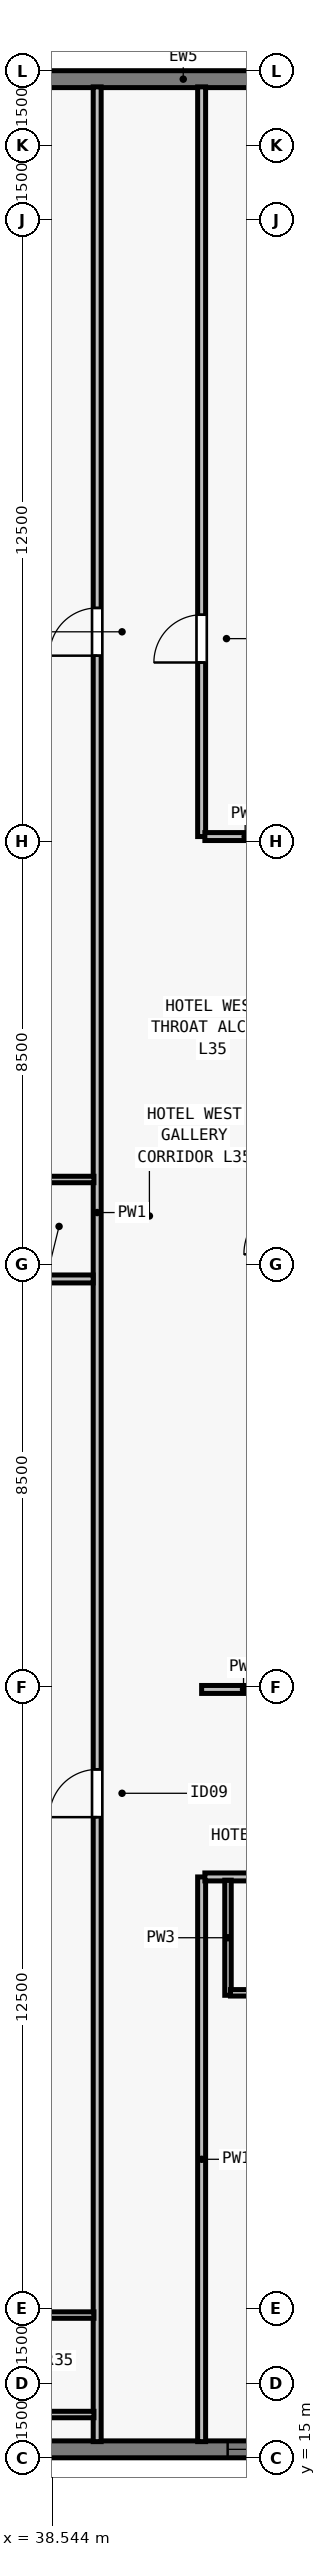
"""IFC4 building model, lengths in metres.
Left out: names, types, materials, properties, quantities, classifications, styles, units other than length and angle.
Written with IfcOpenShell. Run it as: python <this file> out.ifc"""

import sys

from ifc_helpers import new_model, si_unit, direction, frame, frame_2d, origin, place, context, subcontext, project, spatial, rectangle, extrude, element, fill, save


model = new_model("IFC4")
c1 = context("Model", 3, precision=1e-05, world=origin(), true_north=direction((0.0, 1.0)))
c2 = subcontext(c1, "Body", "Model", "MODEL_VIEW")
j1 = project(units=[si_unit("LENGTHUNIT", "METRE"), si_unit("PLANEANGLEUNIT", "RADIAN")], contexts=[c1])
p1 = place(None, origin())
s1 = spatial("IfcSite", under=j1, at=p1, CompositionType="ELEMENT")
p2 = place(p1, origin())
s2 = spatial("IfcBuilding", under=s1, at=p2, CompositionType="ELEMENT")
p3 = place(p2, frame((0.0, 0.0, 130.5)))
s3 = spatial("IfcBuildingStorey", under=s2, at=p3, CompositionType="ELEMENT", Elevation=130.5)
p4 = place(p3, frame((32.0, 62.83, 0.0), z_axis=(0.0, 0.0, 1.0), x_axis=(1.0, 0.0, 0.0)))
e1 = element("IfcWall", 1, at=p4, inside=s3, PredefinedType="SOLIDWALL", context=c2, shape_type="SweptSolid", body=[
    extrude(rectangle(XDim=39.682, YDim=0.34, at=frame_2d((19.841, 0.0))), origin(), (0.0, 0.0, 1.0), 3.28),
])
p5 = place(p4, frame((4.752, 0.0, 0.8)))
e2 = element("IfcOpeningElement", 2, at=p5, cuts=e1, PredefinedType="OPENING", context=c2, shape_type="SweptSolid", body=[
    extrude(rectangle(XDim=1.75, YDim=1.66, at=frame_2d((0.875, 0.83))), frame((0.0, 0.18, 0.0), z_axis=(0.0, -1.0, 0.0), x_axis=(1.0, 0.0, 0.0)), (0.0, 0.0, 1.0), 0.36),
])
p6 = place(p4, frame((11.859, 0.0, 0.8)))
e3 = element("IfcOpeningElement", 3, at=p6, cuts=e1, PredefinedType="OPENING", context=c2, shape_type="SweptSolid", body=[
    extrude(rectangle(XDim=1.75, YDim=1.66, at=frame_2d((0.875, 0.83))), frame((0.0, 0.18, 0.0), z_axis=(0.0, -1.0, 0.0), x_axis=(1.0, 0.0, 0.0)), (0.0, 0.0, 1.0), 0.36),
])
p7 = place(p4, frame((16.062, 0.0, 0.8)))
e4 = element("IfcOpeningElement", 4, at=p7, cuts=e1, PredefinedType="OPENING", context=c2, shape_type="SweptSolid", body=[
    extrude(rectangle(XDim=1.35, YDim=1.66, at=frame_2d((0.675, 0.83))), frame((0.0, 0.18, 0.0), z_axis=(0.0, -1.0, 0.0), x_axis=(1.0, 0.0, 0.0)), (0.0, 0.0, 1.0), 0.36),
])
p8 = place(p4, frame((18.966, 0.0, 0.8)))
e5 = element("IfcOpeningElement", 5, at=p8, cuts=e1, PredefinedType="OPENING", context=c2, shape_type="SweptSolid", body=[
    extrude(rectangle(XDim=1.75, YDim=1.66, at=frame_2d((0.875, 0.83))), frame((0.0, 0.18, 0.0), z_axis=(0.0, -1.0, 0.0), x_axis=(1.0, 0.0, 0.0)), (0.0, 0.0, 1.0), 0.36),
])
p9 = place(p4, frame((22.719, 0.0, 0.8)))
e6 = element("IfcOpeningElement", 6, at=p9, cuts=e1, PredefinedType="OPENING", context=c2, shape_type="SweptSolid", body=[
    extrude(rectangle(XDim=1.35, YDim=1.66, at=frame_2d((0.675, 0.83))), frame((0.0, 0.18, 0.0), z_axis=(0.0, -1.0, 0.0), x_axis=(1.0, 0.0, 0.0)), (0.0, 0.0, 1.0), 0.36),
])
p10 = place(p4, frame((26.073, 0.0, 0.8)))
e7 = element("IfcOpeningElement", 7, at=p10, cuts=e1, PredefinedType="OPENING", context=c2, shape_type="SweptSolid", body=[
    extrude(rectangle(XDim=1.75, YDim=1.66, at=frame_2d((0.875, 0.83))), frame((0.0, 0.18, 0.0), z_axis=(0.0, -1.0, 0.0), x_axis=(1.0, 0.0, 0.0)), (0.0, 0.0, 1.0), 0.36),
])
p11 = place(p4, frame((29.827, 0.0, 0.8)))
e8 = element("IfcOpeningElement", 8, at=p11, cuts=e1, PredefinedType="OPENING", context=c2, shape_type="SweptSolid", body=[
    extrude(rectangle(XDim=1.35, YDim=1.66, at=frame_2d((0.675, 0.83))), frame((0.0, 0.18, 0.0), z_axis=(0.0, -1.0, 0.0), x_axis=(1.0, 0.0, 0.0)), (0.0, 0.0, 1.0), 0.36),
])
p12 = place(p4, frame((34.23, 0.0, 0.8)))
e9 = element("IfcOpeningElement", 9, at=p12, cuts=e1, PredefinedType="OPENING", context=c2, shape_type="SweptSolid", body=[
    extrude(rectangle(XDim=0.9, YDim=1.66, at=frame_2d((0.45, 0.83))), frame((0.0, 0.18, 0.0), z_axis=(0.0, -1.0, 0.0), x_axis=(1.0, 0.0, 0.0)), (0.0, 0.0, 1.0), 0.36),
])
p13 = place(p3, frame((72.0, 15.17, 0.0), z_axis=(0.0, 0.0, 1.0), x_axis=(-1.0, 0.0, 0.0)))
e10 = element("IfcWall", 10, at=p13, inside=s3, PredefinedType="SOLIDWALL", context=c2, shape_type="SweptSolid", body=[
    extrude(rectangle(XDim=39.682, YDim=0.34, at=frame_2d((19.841, 0.0))), origin(), (0.0, 0.0, 1.0), 3.28),
])
p14 = place(p13, frame((8.955, 0.0, 0.8)))
e11 = element("IfcOpeningElement", 11, at=p14, cuts=e10, PredefinedType="OPENING", context=c2, shape_type="SweptSolid", body=[
    extrude(rectangle(XDim=1.35, YDim=1.66, at=frame_2d((0.675, 0.83))), frame((0.0, 0.18, 0.0), z_axis=(0.0, -1.0, 0.0), x_axis=(1.0, 0.0, 0.0)), (0.0, 0.0, 1.0), 0.36),
])
p15 = place(p13, frame((11.859, 0.0, 0.8)))
e12 = element("IfcOpeningElement", 12, at=p15, cuts=e10, PredefinedType="OPENING", context=c2, shape_type="SweptSolid", body=[
    extrude(rectangle(XDim=1.75, YDim=1.66, at=frame_2d((0.875, 0.83))), frame((0.0, 0.18, 0.0), z_axis=(0.0, -1.0, 0.0), x_axis=(1.0, 0.0, 0.0)), (0.0, 0.0, 1.0), 0.36),
])
p16 = place(p13, frame((16.062, 0.0, 0.8)))
e13 = element("IfcOpeningElement", 13, at=p16, cuts=e10, PredefinedType="OPENING", context=c2, shape_type="SweptSolid", body=[
    extrude(rectangle(XDim=1.35, YDim=1.66, at=frame_2d((0.675, 0.83))), frame((0.0, 0.18, 0.0), z_axis=(0.0, -1.0, 0.0), x_axis=(1.0, 0.0, 0.0)), (0.0, 0.0, 1.0), 0.36),
])
p17 = place(p13, frame((18.966, 0.0, 0.8)))
e14 = element("IfcOpeningElement", 14, at=p17, cuts=e10, PredefinedType="OPENING", context=c2, shape_type="SweptSolid", body=[
    extrude(rectangle(XDim=1.75, YDim=1.66, at=frame_2d((0.875, 0.83))), frame((0.0, 0.18, 0.0), z_axis=(0.0, -1.0, 0.0), x_axis=(1.0, 0.0, 0.0)), (0.0, 0.0, 1.0), 0.36),
])
p18 = place(p13, frame((21.469, 0.0, 0.8)))
e15 = element("IfcOpeningElement", 15, at=p18, cuts=e10, PredefinedType="OPENING", context=c2, shape_type="SweptSolid", body=[
    extrude(rectangle(XDim=1.35, YDim=1.66, at=frame_2d((0.675, 0.83))), frame((0.0, 0.18, 0.0), z_axis=(0.0, -1.0, 0.0), x_axis=(1.0, 0.0, 0.0)), (0.0, 0.0, 1.0), 0.36),
])
p19 = place(p13, frame((26.073, 0.0, 0.8)))
e16 = element("IfcOpeningElement", 16, at=p19, cuts=e10, PredefinedType="OPENING", context=c2, shape_type="SweptSolid", body=[
    extrude(rectangle(XDim=1.75, YDim=1.66, at=frame_2d((0.875, 0.83))), frame((0.0, 0.18, 0.0), z_axis=(0.0, -1.0, 0.0), x_axis=(1.0, 0.0, 0.0)), (0.0, 0.0, 1.0), 0.36),
])
p20 = place(p13, frame((28.577, 0.0, 0.8)))
e17 = element("IfcOpeningElement", 17, at=p20, cuts=e10, PredefinedType="OPENING", context=c2, shape_type="SweptSolid", body=[
    extrude(rectangle(XDim=1.35, YDim=1.66, at=frame_2d((0.675, 0.83))), frame((0.0, 0.18, 0.0), z_axis=(0.0, -1.0, 0.0), x_axis=(1.0, 0.0, 0.0)), (0.0, 0.0, 1.0), 0.36),
])
p21 = place(p3, frame((39.45, 15.325, 0.0), z_axis=(0.0, 0.0, 1.0), x_axis=(0.0, 1.0, 0.0)))
e18 = element("IfcWall", 18, at=p21, inside=s3, PredefinedType="PARTITIONING", context=c2, shape_type="SweptSolid", body=[
    extrude(rectangle(XDim=47.35, YDim=0.16, at=frame_2d((23.675, 0.0))), origin(), (0.0, 0.0, 1.0), 2.555),
])
p22 = place(p21, frame((12.557, 0.0, 0.0)))
e19 = element("IfcOpeningElement", 19, at=p22, cuts=e18, PredefinedType="OPENING", context=c2, shape_type="SweptSolid", body=[
    extrude(rectangle(XDim=0.96, YDim=2.15, at=frame_2d((0.48, 1.075))), frame((0.0, 0.09, 0.0), z_axis=(0.0, -1.0, 0.0), x_axis=(1.0, 0.0, 0.0)), (0.0, 0.0, 1.0), 0.18),
])
p23 = place(p21, frame((35.912, 0.0, 0.0)))
e20 = element("IfcOpeningElement", 20, at=p23, cuts=e18, PredefinedType="OPENING", context=c2, shape_type="SweptSolid", body=[
    extrude(rectangle(XDim=0.96, YDim=2.15, at=frame_2d((0.48, 1.075))), frame((0.0, 0.09, 0.0), z_axis=(0.0, -1.0, 0.0), x_axis=(1.0, 0.0, 0.0)), (0.0, 0.0, 1.0), 0.18),
])
p24 = place(p3, frame((41.55, 15.325, 0.0), z_axis=(0.0, 0.0, 1.0), x_axis=(0.0, 1.0, 0.0)))
e21 = element("IfcWall", 21, at=p24, inside=s3, PredefinedType="PARTITIONING", context=c2, shape_type="SweptSolid", body=[
    extrude(rectangle(XDim=11.355, YDim=0.16, at=frame_2d((5.677, 0.0))), origin(), (0.0, 0.0, 1.0), 3.28),
])
p25 = place(p3, frame((41.55, 47.6, 0.0), z_axis=(0.0, 0.0, 1.0), x_axis=(0.0, 1.0, 0.0)))
e22 = element("IfcWall", 22, at=p25, inside=s3, PredefinedType="PARTITIONING", context=c2, shape_type="SweptSolid", body=[
    extrude(rectangle(XDim=15.075, YDim=0.16, at=frame_2d((7.538, 0.0))), origin(), (0.0, 0.0, 1.0), 2.555),
])
p26 = place(p25, frame((3.5, 0.0, 0.0)))
e23 = element("IfcOpeningElement", 23, at=p26, cuts=e22, PredefinedType="OPENING", context=c2, shape_type="SweptSolid", body=[
    extrude(rectangle(XDim=0.96, YDim=2.12, at=frame_2d((0.48, 1.06))), frame((0.0, 0.09, 0.0), z_axis=(0.0, -1.0, 0.0), x_axis=(1.0, 0.0, 0.0)), (0.0, 0.0, 1.0), 0.18),
])
p27 = place(p3, frame((41.55, 30.45, 0.0), z_axis=(0.0, 0.0, 1.0), x_axis=(1.0, 0.0, 0.0)))
e24 = element("IfcWall", 24, at=p27, inside=s3, PredefinedType="PARTITIONING", context=c2, shape_type="SweptSolid", body=[
    extrude(rectangle(XDim=1.685, YDim=0.16, at=frame_2d((0.843, 0.0))), origin(), (0.0, 0.0, 1.0), 3.28),
])
p28 = place(p3, frame((41.615, 47.6, 0.0), z_axis=(0.0, 0.0, 1.0), x_axis=(1.0, 0.0, 0.0)))
e25 = element("IfcWall", 25, at=p28, inside=s3, PredefinedType="PARTITIONING", context=c2, shape_type="SweptSolid", body=[
    extrude(rectangle(XDim=1.62, YDim=0.16, at=frame_2d((0.81, 0.0))), origin(), (0.0, 0.0, 1.0), 3.28),
])
p29 = place(p3, frame((41.615, 26.68, 0.0), z_axis=(0.0, 0.0, 1.0), x_axis=(1.0, 0.0, 0.0)))
e26 = element("IfcWall", 26, at=p29, inside=s3, PredefinedType="PARTITIONING", context=c2, shape_type="SweptSolid", body=[
    extrude(rectangle(XDim=22.07, YDim=0.16, at=frame_2d((11.035, 0.0))), origin(), (0.0, 0.0, 1.0), 3.28),
])
p30 = place(p29, frame((4.281, 0.0, 0.0)))
e27 = element("IfcOpeningElement", 27, at=p30, cuts=e26, PredefinedType="OPENING", context=c2, shape_type="SweptSolid", body=[
    extrude(rectangle(XDim=0.96, YDim=2.15, at=frame_2d((0.48, 1.075))), frame((0.0, 0.09, 0.0), z_axis=(0.0, -1.0, 0.0), x_axis=(1.0, 0.0, 0.0)), (0.0, 0.0, 1.0), 0.18),
])
p31 = place(p29, frame((11.56, 0.0, 0.0)))
e28 = element("IfcOpeningElement", 28, at=p31, cuts=e26, PredefinedType="OPENING", context=c2, shape_type="SweptSolid", body=[
    extrude(rectangle(XDim=0.96, YDim=2.15, at=frame_2d((0.48, 1.075))), frame((0.0, 0.09, 0.0), z_axis=(0.0, -1.0, 0.0), x_axis=(1.0, 0.0, 0.0)), (0.0, 0.0, 1.0), 0.18),
])
p32 = place(p29, frame((19.134, 0.0, 0.0)))
e29 = element("IfcOpeningElement", 29, at=p32, cuts=e26, PredefinedType="OPENING", context=c2, shape_type="SweptSolid", body=[
    extrude(rectangle(XDim=0.96, YDim=2.15, at=frame_2d((0.48, 1.075))), frame((0.0, 0.09, 0.0), z_axis=(0.0, -1.0, 0.0), x_axis=(1.0, 0.0, 0.0)), (0.0, 0.0, 1.0), 0.18),
])
p33 = place(p3, frame((42.08, 24.3, 0.0), z_axis=(0.0, 0.0, 1.0), x_axis=(0.0, 1.0, 0.0)))
e30 = element("IfcWall", 30, at=p33, inside=s3, PredefinedType="PLUMBINGWALL", context=c2, shape_type="SweptSolid", body=[
    extrude(rectangle(XDim=2.315, YDim=0.13, at=frame_2d((1.157, 0.0))), origin(), (0.0, 0.0, 1.0), 3.28),
])
p34 = place(p3, frame((42.13, 24.35, 0.0), z_axis=(0.0, 0.0, 1.0), x_axis=(1.0, 0.0, 0.0)))
e31 = element("IfcWall", 31, at=p34, inside=s3, PredefinedType="PLUMBINGWALL", context=c2, shape_type="SweptSolid", body=[
    extrude(rectangle(XDim=1.9, YDim=0.13, at=frame_2d((0.95, 0.0))), origin(), (0.0, 0.0, 1.0), 3.28),
])
p35 = place(p34, frame((0.54, 0.0, 0.0)))
e32 = element("IfcOpeningElement", 32, at=p35, cuts=e31, PredefinedType="OPENING", context=c2, shape_type="SweptSolid", body=[
    extrude(rectangle(XDim=0.82, YDim=2.1, at=frame_2d((0.41, 1.05))), frame((0.0, 0.075, 0.0), z_axis=(0.0, -1.0, 0.0), x_axis=(1.0, 0.0, 0.0)), (0.0, 0.0, 1.0), 0.15),
])
for number, where, z_axis, x_axis in (
    (33, (37.07, 15.87, 0.0), (0.0, 0.0, 1.0), (1.0, 0.0, 0.0)),
    (34, (37.07, 17.87, 0.0), (0.0, 0.0, 1.0), (1.0, 0.0, 0.0)),
):
    element("IfcWall", number, at=place(p3, frame(where, z_axis=z_axis, x_axis=x_axis)), inside=s3, PredefinedType="PLUMBINGWALL", context=c2, shape_type="SweptSolid", body=[
        extrude(rectangle(XDim=2.315, YDim=0.13, at=frame_2d((1.157, 0.0))), origin(), (0.0, 0.0, 1.0), 3.28),
    ])
p36 = place(p3, frame((28.325, 38.704, 0.0), z_axis=(0.0, 0.0, 1.0), x_axis=(1.0, 0.0, 0.0)))
e35 = element("IfcWall", 35, at=p36, inside=s3, PredefinedType="PARTITIONING", context=c2, shape_type="SweptSolid", body=[
    extrude(rectangle(XDim=11.045, YDim=0.16, at=frame_2d((5.522, 0.0))), origin(), (0.0, 0.0, 1.0), 2.896),
])
p37 = place(p3, frame((37.07, 40.704, 0.0), z_axis=(0.0, 0.0, 1.0), x_axis=(1.0, 0.0, 0.0)))
e36 = element("IfcWall", 36, at=p37, inside=s3, PredefinedType="PLUMBINGWALL", context=c2, shape_type="SweptSolid", body=[
    extrude(rectangle(XDim=2.315, YDim=0.13, at=frame_2d((1.157, 0.0))), origin(), (0.0, 0.0, 1.0), 3.28),
])
p38 = place(p20, origin())
e37 = element("IfcWindow", 37, at=p38, inside=s3, PartitioningType="SINGLE_PANEL", PredefinedType="WINDOW", context=c2, shape_type="SweptSolid", body=[
    extrude(rectangle(XDim=1.35, YDim=1.66, at=frame_2d((0.675, 0.83))), frame((0.0, -0.05, 0.0), z_axis=(0.0, -1.0, 0.0), x_axis=(1.0, 0.0, 0.0)), (0.0, 0.0, 1.0), 0.06),
])
fill(e17, e37)
p39 = place(p26, origin())
e38 = element("IfcDoor", 38, at=p39, inside=s3, OperationType="SINGLE_SWING_LEFT", PredefinedType="DOOR", context=c2, shape_type="SweptSolid", body=[
    extrude(rectangle(XDim=0.96, YDim=2.12, at=frame_2d((0.48, 1.06))), frame((0.0, 0.025, 0.0), z_axis=(0.0, -1.0, 0.0), x_axis=(1.0, 0.0, 0.0)), (0.0, 0.0, 1.0), 0.05),
])
fill(e23, e38)
p40 = place(p22, origin())
e39 = element("IfcDoor", 39, at=p40, inside=s3, OperationType="SINGLE_SWING_LEFT", PredefinedType="DOOR", context=c2, shape_type="SweptSolid", body=[
    extrude(rectangle(XDim=0.96, YDim=2.15, at=frame_2d((0.48, 1.075))), frame((0.0, 0.025, 0.0), z_axis=(0.0, -1.0, 0.0), x_axis=(1.0, 0.0, 0.0)), (0.0, 0.0, 1.0), 0.05),
])
fill(e19, e39)
p41 = place(p23, origin())
e40 = element("IfcDoor", 40, at=p41, inside=s3, OperationType="SINGLE_SWING_LEFT", PredefinedType="DOOR", context=c2, shape_type="SweptSolid", body=[
    extrude(rectangle(XDim=0.96, YDim=2.15, at=frame_2d((0.48, 1.075))), frame((0.0, 0.025, 0.0), z_axis=(0.0, -1.0, 0.0), x_axis=(1.0, 0.0, 0.0)), (0.0, 0.0, 1.0), 0.05),
])
fill(e20, e40)
save(model, sys.argv[1])
